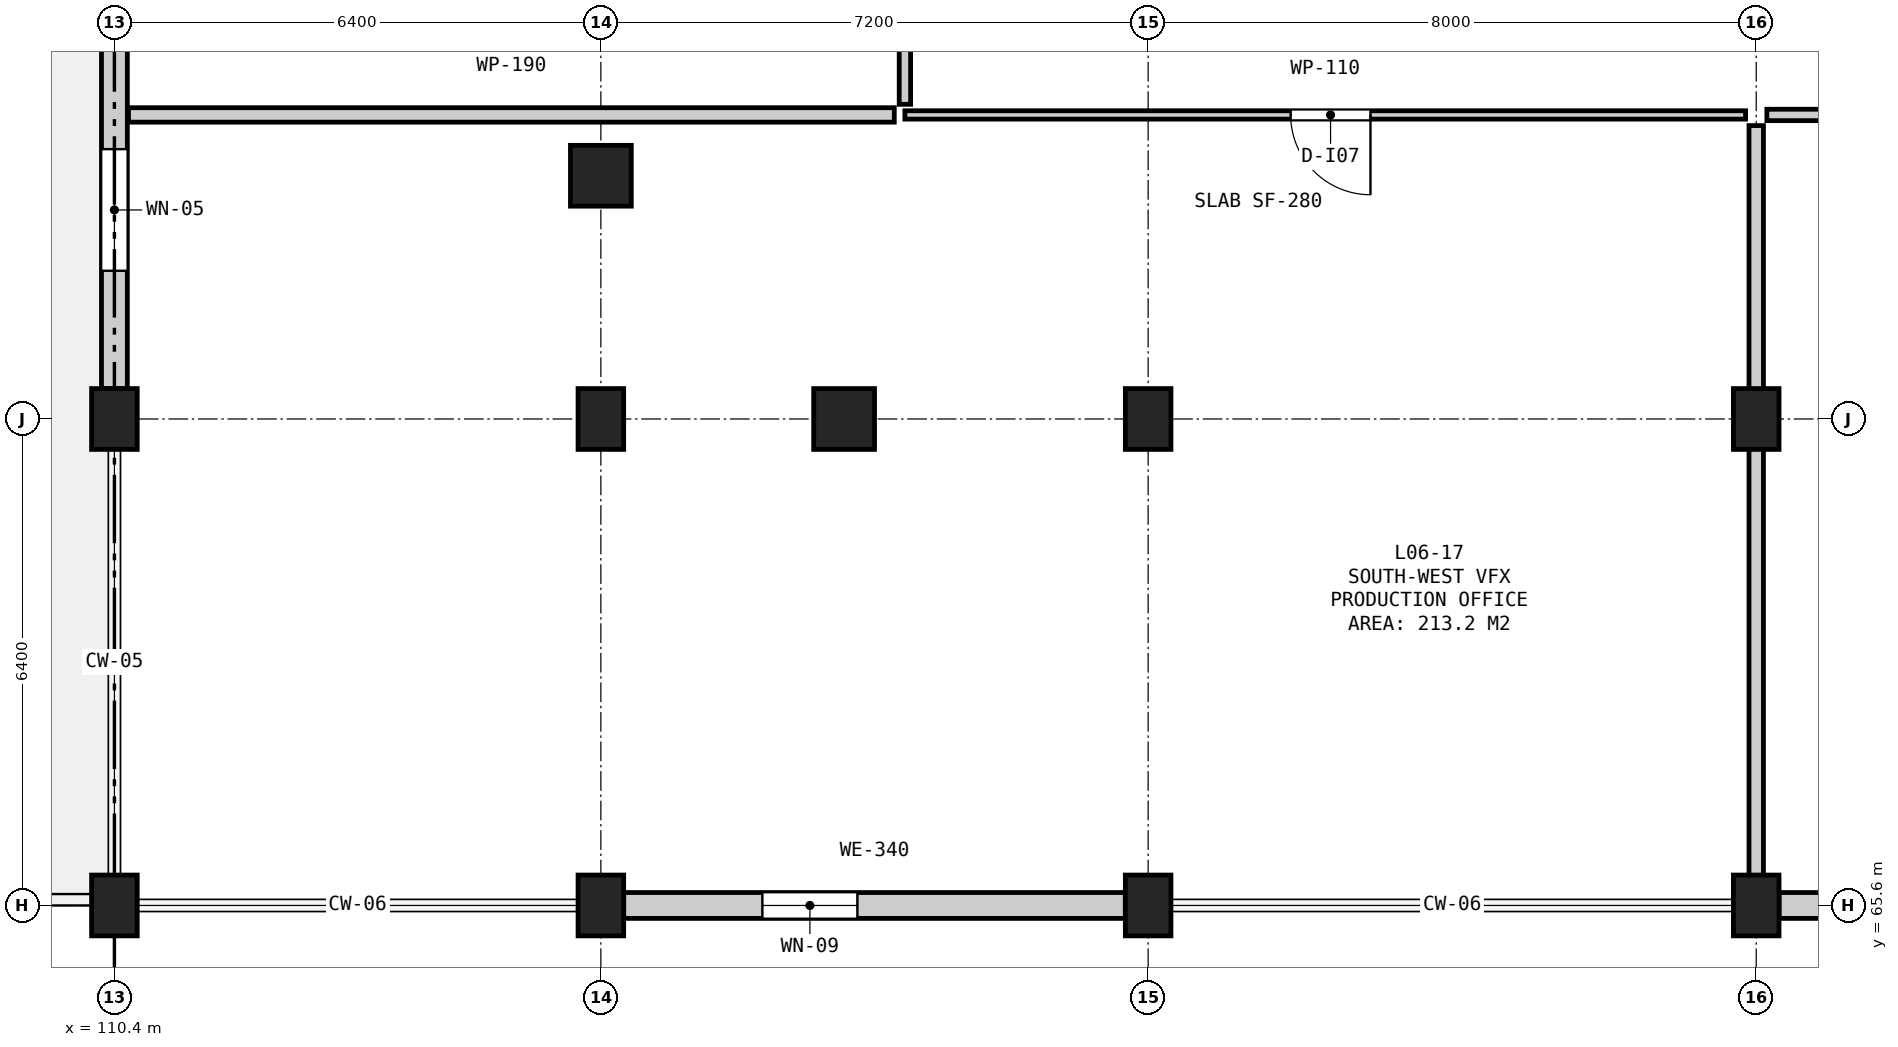
"""IFC4 building model, lengths in metres.
Left out: names, types, materials, properties, quantities, classifications, styles, units other than length and angle.
Written with IfcOpenShell. Run it as: python <this file> out.ifc"""

import sys

from ifc_helpers import new_model, si_unit, direction, frame, frame_2d, origin, origin_2d, place, context, subcontext, project, spatial, rectangle, circle, extrude, element, fill, save


model = new_model("IFC4")
c1 = context("Model", 3, precision=1e-05, world=origin(), true_north=direction((0.0, 1.0)))
c2 = subcontext(c1, "Body", "Model", "MODEL_VIEW")
j1 = project(units=[si_unit("LENGTHUNIT", "METRE"), si_unit("PLANEANGLEUNIT", "RADIAN")], contexts=[c1])
p1 = place(None, origin())
s1 = spatial("IfcSite", under=j1, at=p1, CompositionType="ELEMENT")
p2 = place(p1, origin())
s2 = spatial("IfcBuilding", under=s1, at=p2, CompositionType="ELEMENT")
p3 = place(p2, frame((0.0, 0.0, 27.8)))
s3 = spatial("IfcBuildingStorey", under=s2, at=p3, CompositionType="ELEMENT", Elevation=27.8)
for number, where, z_axis, x_axis in (
    (1, (110.4, 65.6, 0.0), (0.0, 0.0, 1.0), (1.0, 0.0, 0.0)),
    (2, (110.4, 72.0, 0.0), (0.0, 0.0, 1.0), (1.0, 0.0, 0.0)),
    (3, (116.8, 65.6, 0.0), (0.0, 0.0, 1.0), (1.0, 0.0, 0.0)),
    (4, (116.8, 72.0, 0.0), (0.0, 0.0, 1.0), (1.0, 0.0, 0.0)),
):
    element("IfcColumn", number, at=place(p3, frame(where, z_axis=z_axis, x_axis=x_axis)), inside=s3, PredefinedType="COLUMN", context=c2, shape_type="SweptSolid", body=[
        extrude(rectangle(XDim=0.6, YDim=0.8, at=origin_2d()), origin(), (0.0, 0.0, 1.0), 3.9),
    ])
for number, where, z_axis, x_axis in (
    (5, (116.8, 75.2, 0.0), (0.0, 0.0, 1.0), (1.0, 0.0, 0.0)),
    (6, (120.0, 72.0, 0.0), (0.0, 0.0, 1.0), (1.0, 0.0, 0.0)),
):
    element("IfcColumn", number, at=place(p3, frame(where, z_axis=z_axis, x_axis=x_axis)), inside=s3, PredefinedType="COLUMN", context=c2, shape_type="SweptSolid", body=[
        extrude(circle(Radius=0.4, at=origin_2d()), origin(), (0.0, 0.0, 1.0), 3.9),
    ])
for number, where, z_axis, x_axis in (
    (7, (124.0, 65.6, 0.0), (0.0, 0.0, 1.0), (1.0, 0.0, 0.0)),
    (8, (124.0, 72.0, 0.0), (0.0, 0.0, 1.0), (1.0, 0.0, 0.0)),
    (9, (132.0, 65.6, 0.0), (0.0, 0.0, 1.0), (1.0, 0.0, 0.0)),
    (10, (132.0, 72.0, 0.0), (0.0, 0.0, 1.0), (1.0, 0.0, 0.0)),
):
    element("IfcColumn", number, at=place(p3, frame(where, z_axis=z_axis, x_axis=x_axis)), inside=s3, PredefinedType="COLUMN", context=c2, shape_type="SweptSolid", body=[
        extrude(rectangle(XDim=0.6, YDim=0.8, at=origin_2d()), origin(), (0.0, 0.0, 1.0), 3.9),
    ])
p4 = place(p3, frame((117.1, 65.6, 0.0), z_axis=(0.0, 0.0, 1.0), x_axis=(1.0, 0.0, 0.0)))
e11 = element("IfcWall", 11, at=p4, inside=s3, PredefinedType="SOLIDWALL", context=c2, shape_type="SweptSolid", body=[
    extrude(rectangle(XDim=6.6, YDim=0.34, at=frame_2d((3.3, 0.0))), origin(), (0.0, 0.0, 1.0), 3.04),
])
p5 = place(p4, frame((1.825, 0.0, 0.9)))
e12 = element("IfcOpeningElement", 12, at=p5, cuts=e11, PredefinedType="OPENING", context=c2, shape_type="SweptSolid", body=[
    extrude(rectangle(XDim=1.25, YDim=1.9, at=frame_2d((0.625, 0.95))), frame((0.0, 0.182, 0.0), z_axis=(0.0, -1.0, 0.0), x_axis=(1.0, 0.0, 0.0)), (0.0, 0.0, 1.0), 0.364),
])
p6 = place(p3, frame((132.3, 65.6, 0.0), z_axis=(0.0, 0.0, 1.0), x_axis=(1.0, 0.0, 0.0)))
e13 = element("IfcWall", 13, at=p6, inside=s3, PredefinedType="SOLIDWALL", context=c2, shape_type="SweptSolid", body=[
    extrude(rectangle(XDim=7.4, YDim=0.34, at=frame_2d((3.7, 0.0))), origin(), (0.0, 0.0, 1.0), 3.025),
])
p7 = place(p6, frame((2.3, 0.0, 0.9)))
e14 = element("IfcOpeningElement", 14, at=p7, cuts=e13, PredefinedType="OPENING", context=c2, shape_type="SweptSolid", body=[
    extrude(rectangle(XDim=1.1, YDim=1.55, at=frame_2d((0.55, 0.775))), frame((0.0, 0.182, 0.0), z_axis=(0.0, -1.0, 0.0), x_axis=(1.0, 0.0, 0.0)), (0.0, 0.0, 1.0), 0.364),
])
p8 = place(p3, frame((110.4, 78.8, 0.0), z_axis=(0.0, 0.0, 1.0), x_axis=(0.0, -1.0, 0.0)))
e15 = element("IfcWall", 15, at=p8, inside=s3, PredefinedType="SOLIDWALL", context=c2, shape_type="SweptSolid", body=[
    extrude(rectangle(XDim=6.4, YDim=0.34, at=frame_2d((3.2, 0.0))), origin(), (0.0, 0.0, 1.0), 3.04),
])
p9 = place(p8, frame((3.25, 0.0, 0.9)))
e16 = element("IfcOpeningElement", 16, at=p9, cuts=e15, PredefinedType="OPENING", context=c2, shape_type="SweptSolid", body=[
    extrude(rectangle(XDim=1.6, YDim=1.95, at=frame_2d((0.8, 0.975))), frame((0.0, 0.182, 0.0), z_axis=(0.0, -1.0, 0.0), x_axis=(1.0, 0.0, 0.0)), (0.0, 0.0, 1.0), 0.364),
])
p10 = place(p3, frame((110.585, 76.0, 0.0), z_axis=(0.0, 0.0, 1.0), x_axis=(1.0, 0.0, 0.0)))
e17 = element("IfcWall", 17, at=p10, inside=s3, PredefinedType="PARTITIONING", context=c2, shape_type="SweptSolid", body=[
    extrude(rectangle(XDim=10.075, YDim=0.19, at=frame_2d((5.038, 0.0))), origin(), (0.0, 0.0, 1.0), 3.62),
])
p11 = place(p3, frame((120.8, 76.14, 0.0), z_axis=(0.0, 0.0, 1.0), x_axis=(0.0, 1.0, 0.0)))
e18 = element("IfcWall", 18, at=p11, inside=s3, PredefinedType="PARTITIONING", context=c2, shape_type="SweptSolid", body=[
    extrude(rectangle(XDim=22.12, YDim=0.15, at=frame_2d((11.06, 0.0))), origin(), (0.0, 0.0, 1.0), 3.62),
])
p12 = place(p11, frame((10.535, 0.0, 0.0)))
e19 = element("IfcOpeningElement", 19, at=p12, cuts=e18, PredefinedType="OPENING", context=c2, shape_type="SweptSolid", body=[
    extrude(rectangle(XDim=1.05, YDim=2.15, at=frame_2d((0.525, 1.075))), frame((0.0, 0.087, 0.0), z_axis=(0.0, -1.0, 0.0), x_axis=(1.0, 0.0, 0.0)), (0.0, 0.0, 1.0), 0.174),
])
p13 = place(p3, frame((120.8, 76.0, 0.0), z_axis=(0.0, 0.0, 1.0), x_axis=(1.0, 0.0, 0.0)))
e20 = element("IfcWall", 20, at=p13, inside=s3, PredefinedType="PARTITIONING", context=c2, shape_type="SweptSolid", body=[
    extrude(rectangle(XDim=11.06, YDim=0.11, at=frame_2d((5.53, 0.0))), origin(), (0.0, 0.0, 1.0), 3.62),
])
p14 = place(p13, frame((5.075, 0.0, 0.0)))
e21 = element("IfcOpeningElement", 21, at=p14, cuts=e20, PredefinedType="OPENING", context=c2, shape_type="SweptSolid", body=[
    extrude(rectangle(XDim=1.05, YDim=2.15, at=frame_2d((0.525, 1.075))), frame((0.0, 0.067, 0.0), z_axis=(0.0, -1.0, 0.0), x_axis=(1.0, 0.0, 0.0)), (0.0, 0.0, 1.0), 0.134),
])
p15 = place(p3, frame((132.0, 65.785, 0.0), z_axis=(0.0, 0.0, 1.0), x_axis=(0.0, 1.0, 0.0)))
e22 = element("IfcWall", 22, at=p15, inside=s3, PredefinedType="PARTITIONING", context=c2, shape_type="SweptSolid", body=[
    extrude(rectangle(XDim=10.075, YDim=0.19, at=frame_2d((5.038, 0.0))), origin(), (0.0, 0.0, 1.0), 2.785),
])
p16 = place(p3, frame((132.14, 76.0, 0.0), z_axis=(0.0, 0.0, 1.0), x_axis=(1.0, 0.0, 0.0)))
e23 = element("IfcWall", 23, at=p16, inside=s3, PredefinedType="PARTITIONING", context=c2, shape_type="SweptSolid", body=[
    extrude(rectangle(XDim=13.32, YDim=0.15, at=frame_2d((6.66, 0.0))), origin(), (0.0, 0.0, 1.0), 3.62),
])
p17 = place(p16, frame((6.135, 0.0, 0.0)))
e24 = element("IfcOpeningElement", 24, at=p17, cuts=e23, PredefinedType="OPENING", context=c2, shape_type="SweptSolid", body=[
    extrude(rectangle(XDim=1.05, YDim=2.15, at=frame_2d((0.525, 1.075))), frame((0.0, 0.087, 0.0), z_axis=(0.0, -1.0, 0.0), x_axis=(1.0, 0.0, 0.0)), (0.0, 0.0, 1.0), 0.174),
])
p18 = place(p5, origin())
e25 = element("IfcWindow", 25, at=p18, inside=s3, PartitioningType="SINGLE_PANEL", PredefinedType="WINDOW", context=c2, shape_type="SweptSolid", body=[
    extrude(rectangle(XDim=1.25, YDim=1.9, at=frame_2d((0.625, 0.95))), frame((0.0, 0.03, 0.0), z_axis=(0.0, -1.0, 0.0), x_axis=(1.0, 0.0, 0.0)), (0.0, 0.0, 1.0), 0.06),
])
fill(e12, e25)
p19 = place(p9, origin())
e26 = element("IfcWindow", 26, at=p19, inside=s3, PartitioningType="DOUBLE_PANEL_VERTICAL", PredefinedType="WINDOW", context=c2, shape_type="SweptSolid", body=[
    extrude(rectangle(XDim=1.6, YDim=1.95, at=frame_2d((0.8, 0.975))), frame((0.0, 0.03, 0.0), z_axis=(0.0, -1.0, 0.0), x_axis=(1.0, 0.0, 0.0)), (0.0, 0.0, 1.0), 0.06),
])
fill(e16, e26)
p20 = place(p14, frame((1.05, 0.0, 0.0), z_axis=(0.0, 0.0, 1.0), x_axis=(-1.0, 0.0, 0.0)))
e27 = element("IfcDoor", 27, at=p20, inside=s3, OperationType="SINGLE_SWING_LEFT", PredefinedType="DOOR", context=c2, shape_type="SweptSolid", body=[
    extrude(rectangle(XDim=1.05, YDim=2.15, at=frame_2d((0.525, 1.075))), frame((0.0, 0.025, 0.0), z_axis=(0.0, -1.0, 0.0), x_axis=(1.0, 0.0, 0.0)), (0.0, 0.0, 1.0), 0.05),
])
fill(e21, e27)
save(model, sys.argv[1])
